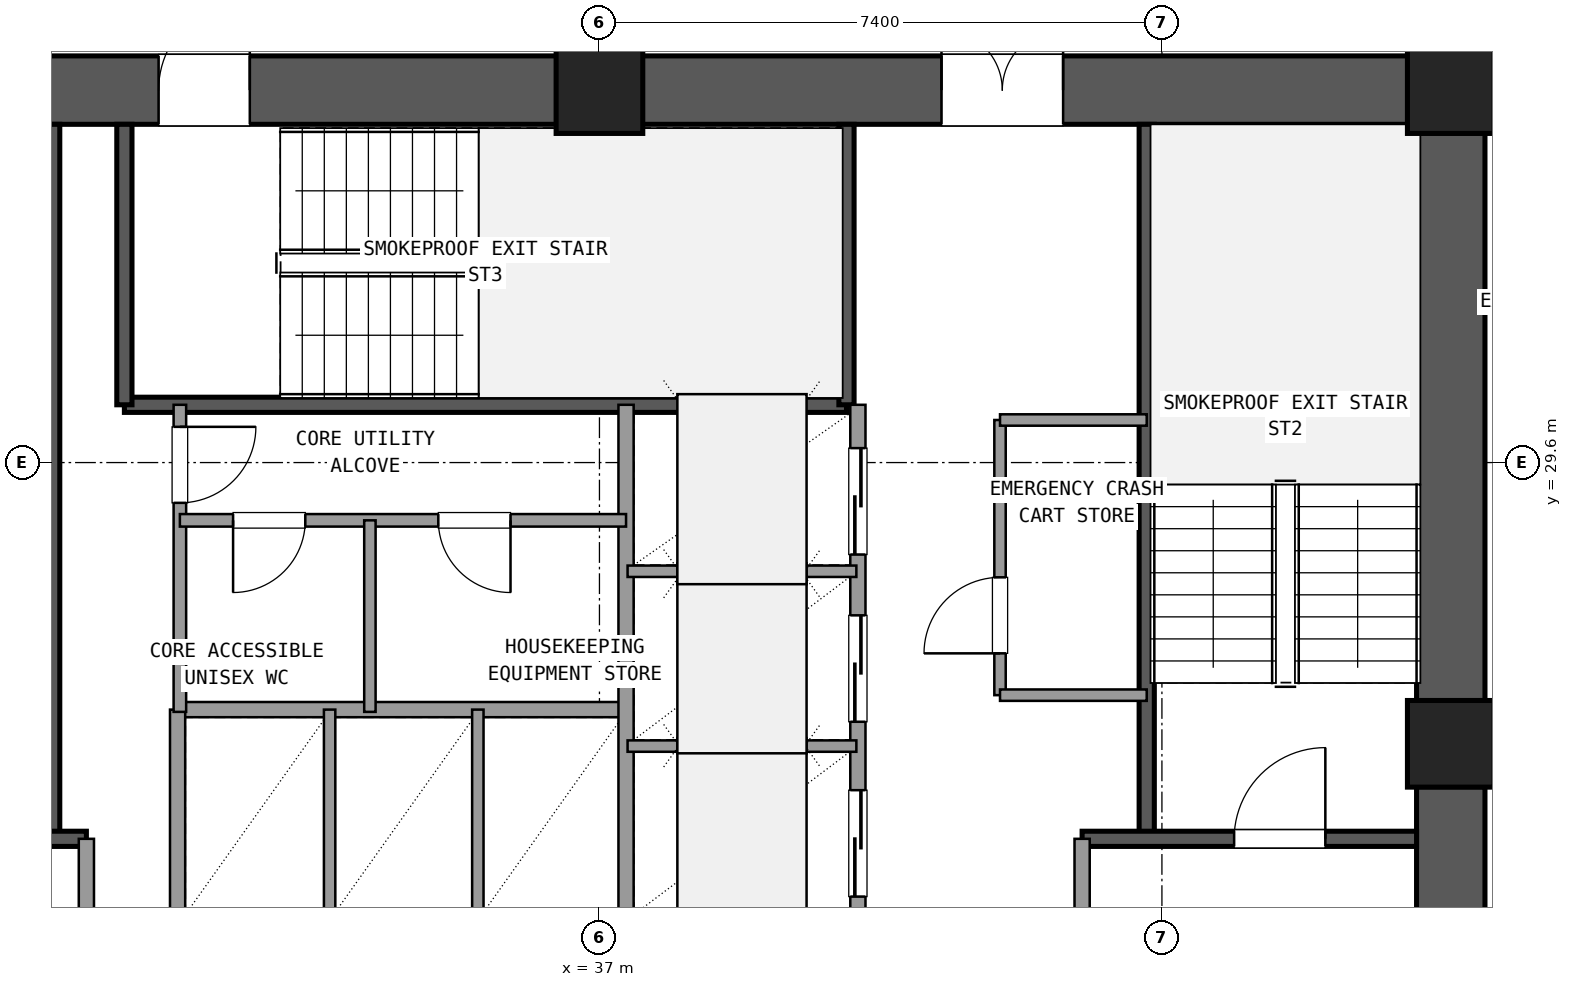
"""IFC4 building model, lengths in metres.
Left out: names, types, materials, properties, quantities, classifications, styles, units other than length and angle.
Written with IfcOpenShell. Run it as: python <this file> out.ifc"""

import sys

from ifc_helpers import new_model, si_unit, direction, frame, frame_2d, origin, origin_2d, place, context, subcontext, project, spatial, rectangle, extrude, element, fill, save


model = new_model("IFC4")
c1 = context("Model", 3, precision=1e-05, world=origin(), true_north=direction((0.0, 1.0)))
c2 = subcontext(c1, "Body", "Model", "MODEL_VIEW")
j1 = project(units=[si_unit("LENGTHUNIT", "METRE"), si_unit("PLANEANGLEUNIT", "RADIAN")], contexts=[c1])
p1 = place(None, origin())
s1 = spatial("IfcSite", under=j1, at=p1, CompositionType="ELEMENT")
p2 = place(p1, origin())
s2 = spatial("IfcBuilding", under=s1, at=p2, CompositionType="ELEMENT")
p3 = place(p2, frame((0.0, 0.0, 56.34)))
s3 = spatial("IfcBuildingStorey", under=s2, at=p3, CompositionType="ELEMENT", Elevation=56.34)
for number, where, z_axis, x_axis in (
    (1, (48.2, 25.9, 0.0), (0.0, 0.0, 1.0), (1.0, 0.0, 0.0)),
    (2, (48.2, 34.5, 0.0), (0.0, 0.0, 1.0), (1.0, 0.0, 0.0)),
    (3, (37.0, 34.5, 0.0), (0.0, 0.0, 1.0), (1.0, 0.0, 0.0)),
):
    element("IfcColumn", number, at=place(p3, frame(where, z_axis=z_axis, x_axis=x_axis)), inside=s3, PredefinedType="COLUMN", context=c2, shape_type="SweptSolid", body=[
        extrude(rectangle(XDim=1.14, YDim=1.14, at=origin_2d()), origin(), (0.0, 0.0, 1.0), 3.6),
    ])
p4 = place(p3, frame((48.2, 17.865, 0.0), z_axis=(0.0, 0.0, 1.0), x_axis=(0.0, 1.0, 0.0)))
e4 = element("IfcWall", 4, at=p4, inside=s3, PredefinedType="SHEAR", context=c2, shape_type="SweptSolid", body=[
    extrude(rectangle(XDim=7.47, YDim=0.9, at=frame_2d((3.735, 0.0))), origin(), (0.0, 0.0, 1.0), 3.32),
])
p5 = place(p4, frame((4.185, 0.0, 0.0)))
e5 = element("IfcOpeningElement", 5, at=p5, cuts=e4, PredefinedType="OPENING", context=c2, shape_type="SweptSolid", body=[
    extrude(rectangle(XDim=1.2, YDim=2.15, at=frame_2d((0.6, 1.075))), frame((0.0, 0.46, 0.0), z_axis=(0.0, -1.0, 0.0), x_axis=(1.0, 0.0, 0.0)), (0.0, 0.0, 1.0), 0.92),
])
p6 = place(p3, frame((48.2, 26.465, 0.0), z_axis=(0.0, 0.0, 1.0), x_axis=(0.0, 1.0, 0.0)))
e6 = element("IfcWall", 6, at=p6, inside=s3, PredefinedType="SHEAR", context=c2, shape_type="SweptSolid", body=[
    extrude(rectangle(XDim=7.47, YDim=0.9, at=frame_2d((3.735, 0.0))), origin(), (0.0, 0.0, 1.0), 3.32),
])
p7 = place(p3, frame((47.635, 34.5, 0.0), z_axis=(0.0, 0.0, 1.0), x_axis=(-1.0, 0.0, 0.0)))
e7 = element("IfcWall", 7, at=p7, inside=s3, PredefinedType="SHEAR", context=c2, shape_type="SweptSolid", body=[
    extrude(rectangle(XDim=10.07, YDim=0.9, at=frame_2d((5.035, 0.0))), origin(), (0.0, 0.0, 1.0), 3.32),
])
p8 = place(p7, frame((4.535, 0.0, 0.0)))
e8 = element("IfcOpeningElement", 8, at=p8, cuts=e7, PredefinedType="OPENING", context=c2, shape_type="SweptSolid", body=[
    extrude(rectangle(XDim=1.6, YDim=2.2, at=frame_2d((0.8, 1.1))), frame((0.0, 0.46, 0.0), z_axis=(0.0, -1.0, 0.0), x_axis=(1.0, 0.0, 0.0)), (0.0, 0.0, 1.0), 0.92),
])
p9 = place(p3, frame((36.435, 34.5, 0.0), z_axis=(0.0, 0.0, 1.0), x_axis=(-1.0, 0.0, 0.0)))
e9 = element("IfcWall", 9, at=p9, inside=s3, PredefinedType="SHEAR", context=c2, shape_type="SweptSolid", body=[
    extrude(rectangle(XDim=10.07, YDim=0.9, at=frame_2d((5.035, 0.0))), origin(), (0.0, 0.0, 1.0), 3.32),
])
p10 = place(p9, frame((4.035, 0.0, 0.0)))
e10 = element("IfcOpeningElement", 10, at=p10, cuts=e9, PredefinedType="OPENING", context=c2, shape_type="SweptSolid", body=[
    extrude(rectangle(XDim=1.2, YDim=2.15, at=frame_2d((0.6, 1.075))), frame((0.0, 0.46, 0.0), z_axis=(0.0, -1.0, 0.0), x_axis=(1.0, 0.0, 0.0)), (0.0, 0.0, 1.0), 0.92),
])
p11 = place(p3, frame((29.8, 24.65, 0.0), z_axis=(0.0, 0.0, 1.0), x_axis=(0.0, 1.0, 0.0)))
e11 = element("IfcWall", 11, at=p11, inside=s3, PredefinedType="SHEAR", context=c2, shape_type="SweptSolid", body=[
    extrude(rectangle(XDim=9.4, YDim=0.2, at=frame_2d((4.7, 0.0))), origin(), (0.0, 0.0, 1.0), 3.32),
])
p12 = place(p3, frame((26.25, 24.65, 0.0), z_axis=(0.0, 0.0, 1.0), x_axis=(1.0, 0.0, 0.0)))
e12 = element("IfcWall", 12, at=p12, inside=s3, PredefinedType="SHEAR", context=c2, shape_type="SweptSolid", body=[
    extrude(rectangle(XDim=4.0, YDim=0.2, at=frame_2d((2.0, 0.0))), origin(), (0.0, 0.0, 1.0), 3.32),
])
p13 = place(p12, frame((1.0, 0.0, 0.0)))
e13 = element("IfcOpeningElement", 13, at=p13, cuts=e12, PredefinedType="OPENING", context=c2, shape_type="SweptSolid", body=[
    extrude(rectangle(XDim=1.2, YDim=2.15, at=frame_2d((0.6, 1.075))), frame((0.0, 0.11, 0.0), z_axis=(0.0, -1.0, 0.0), x_axis=(1.0, 0.0, 0.0)), (0.0, 0.0, 1.0), 0.22),
])
p14 = place(p3, frame((44.2, 24.65, 0.0), z_axis=(0.0, 0.0, 1.0), x_axis=(0.0, 1.0, 0.0)))
e14 = element("IfcWall", 14, at=p14, inside=s3, PredefinedType="SHEAR", context=c2, shape_type="SweptSolid", body=[
    extrude(rectangle(XDim=9.4, YDim=0.2, at=frame_2d((4.7, 0.0))), origin(), (0.0, 0.0, 1.0), 3.32),
])
p15 = place(p3, frame((43.35, 24.65, 0.0), z_axis=(0.0, 0.0, 1.0), x_axis=(1.0, 0.0, 0.0)))
e15 = element("IfcWall", 15, at=p15, inside=s3, PredefinedType="SHEAR", context=c2, shape_type="SweptSolid", body=[
    extrude(rectangle(XDim=4.4, YDim=0.2, at=frame_2d((2.2, 0.0))), origin(), (0.0, 0.0, 1.0), 3.32),
])
p16 = place(p15, frame((2.0, 0.0, 0.0)))
e16 = element("IfcOpeningElement", 16, at=p16, cuts=e15, PredefinedType="OPENING", context=c2, shape_type="SweptSolid", body=[
    extrude(rectangle(XDim=1.2, YDim=2.15, at=frame_2d((0.6, 1.075))), frame((0.0, 0.11, 0.0), z_axis=(0.0, -1.0, 0.0), x_axis=(1.0, 0.0, 0.0)), (0.0, 0.0, 1.0), 0.22),
])
p17 = place(p3, frame((30.75, 30.36, 0.0), z_axis=(0.0, 0.0, 1.0), x_axis=(1.0, 0.0, 0.0)))
e17 = element("IfcWall", 17, at=p17, inside=s3, PredefinedType="SHEAR", context=c2, shape_type="SweptSolid", body=[
    extrude(rectangle(XDim=9.5, YDim=0.2, at=frame_2d((4.75, 0.0))), origin(), (0.0, 0.0, 1.0), 3.32),
])
for number, where, z_axis, x_axis in (
    (18, (30.75, 30.36, 0.0), (0.0, 0.0, 1.0), (0.0, 1.0, 0.0)),
    (19, (40.25, 30.36, 0.0), (0.0, 0.0, 1.0), (0.0, 1.0, 0.0)),
):
    element("IfcWall", number, at=place(p3, frame(where, z_axis=z_axis, x_axis=x_axis)), inside=s3, PredefinedType="SHEAR", context=c2, shape_type="SweptSolid", body=[
        extrude(rectangle(XDim=3.69, YDim=0.2, at=frame_2d((1.845, 0.0))), origin(), (0.0, 0.0, 1.0), 3.32),
    ])
p18 = place(p3, frame((30.25, 17.75, 0.0), z_axis=(0.0, 0.0, 1.0), x_axis=(0.0, 1.0, 0.0)))
e20 = element("IfcWall", 20, at=p18, inside=s3, PredefinedType="SOLIDWALL", context=c2, shape_type="SweptSolid", body=[
    extrude(rectangle(XDim=6.9, YDim=0.2, at=frame_2d((3.45, 0.0))), origin(), (0.0, 0.0, 1.0), 2.61),
])
p19 = place(p18, frame((4.15, 0.0, 0.0)))
e21 = element("IfcOpeningElement", 21, at=p19, cuts=e20, PredefinedType="OPENING", context=c2, shape_type="SweptSolid", body=[
    extrude(rectangle(XDim=1.2, YDim=2.15, at=frame_2d((0.6, 1.075))), frame((0.0, 0.11, 0.0), z_axis=(0.0, -1.0, 0.0), x_axis=(1.0, 0.0, 0.0)), (0.0, 0.0, 1.0), 0.22),
])
p20 = place(p3, frame((43.35, 17.75, 0.0), z_axis=(0.0, 0.0, 1.0), x_axis=(0.0, 1.0, 0.0)))
e22 = element("IfcWall", 22, at=p20, inside=s3, PredefinedType="SOLIDWALL", context=c2, shape_type="SweptSolid", body=[
    extrude(rectangle(XDim=6.9, YDim=0.2, at=frame_2d((3.45, 0.0))), origin(), (0.0, 0.0, 1.0), 2.61),
])
p21 = place(p20, frame((4.15, 0.0, 0.0)))
e23 = element("IfcOpeningElement", 23, at=p21, cuts=e22, PredefinedType="OPENING", context=c2, shape_type="SweptSolid", body=[
    extrude(rectangle(XDim=1.2, YDim=2.15, at=frame_2d((0.6, 1.075))), frame((0.0, 0.11, 0.0), z_axis=(0.0, -1.0, 0.0), x_axis=(1.0, 0.0, 0.0)), (0.0, 0.0, 1.0), 0.22),
])
p22 = place(p3, frame((31.45, 26.35, 0.0), z_axis=(0.0, 0.0, 1.0), x_axis=(1.0, 0.0, 0.0)))
e24 = element("IfcWall", 24, at=p22, inside=s3, PredefinedType="SOLIDWALL", context=c2, shape_type="SweptSolid", body=[
    extrude(rectangle(XDim=5.9, YDim=0.2, at=frame_2d((2.95, 0.0))), origin(), (0.0, 0.0, 1.0), 2.61),
])
p23 = place(p3, frame((31.45, 23.54, 0.0), z_axis=(0.0, 0.0, 1.0), x_axis=(0.0, 1.0, 0.0)))
e25 = element("IfcWall", 25, at=p23, inside=s3, PredefinedType="SOLIDWALL", context=c2, shape_type="SweptSolid", body=[
    extrude(rectangle(XDim=2.81, YDim=0.2, at=frame_2d((1.405, 0.0))), origin(), (0.0, 0.0, 1.0), 2.61),
])
for number, where, z_axis, x_axis in (
    (26, (33.45, 23.54, 0.0), (0.0, 0.0, 1.0), (0.0, 1.0, 0.0)),
    (27, (35.4, 23.54, 0.0), (0.0, 0.0, 1.0), (0.0, 1.0, 0.0)),
):
    element("IfcWall", number, at=place(p3, frame(where, z_axis=z_axis, x_axis=x_axis)), inside=s3, PredefinedType="PARTITIONING", context=c2, shape_type="SweptSolid", body=[
        extrude(rectangle(XDim=2.81, YDim=0.15, at=frame_2d((1.405, 0.0))), origin(), (0.0, 0.0, 1.0), 2.61),
    ])
p24 = place(p3, frame((37.35, 23.54, 0.0), z_axis=(0.0, 0.0, 1.0), x_axis=(0.0, 1.0, 0.0)))
e28 = element("IfcWall", 28, at=p24, inside=s3, PredefinedType="SOLIDWALL", context=c2, shape_type="SweptSolid", body=[
    extrude(rectangle(XDim=6.82, YDim=0.2, at=frame_2d((3.41, 0.0))), origin(), (0.0, 0.0, 1.0), 2.61),
])
p25 = place(p3, frame((40.4, 23.54, 0.0), z_axis=(0.0, 0.0, 1.0), x_axis=(0.0, 1.0, 0.0)))
e29 = element("IfcWall", 29, at=p25, inside=s3, PredefinedType="SOLIDWALL", context=c2, shape_type="SweptSolid", body=[
    extrude(rectangle(XDim=6.82, YDim=0.2, at=frame_2d((3.41, 0.0))), origin(), (0.0, 0.0, 1.0), 2.61),
])
p26 = place(p25, frame((0.35, 0.0, 0.0)))
e30 = element("IfcOpeningElement", 30, at=p26, cuts=e29, PredefinedType="OPENING", context=c2, shape_type="SweptSolid", body=[
    extrude(rectangle(XDim=1.4, YDim=2.2, at=frame_2d((0.7, 1.1))), frame((0.0, 0.11, 0.0), z_axis=(0.0, -1.0, 0.0), x_axis=(1.0, 0.0, 0.0)), (0.0, 0.0, 1.0), 0.22),
])
p27 = place(p25, frame((2.65, 0.0, 0.0)))
e31 = element("IfcOpeningElement", 31, at=p27, cuts=e29, PredefinedType="OPENING", context=c2, shape_type="SweptSolid", body=[
    extrude(rectangle(XDim=1.4, YDim=2.2, at=frame_2d((0.7, 1.1))), frame((0.0, 0.11, 0.0), z_axis=(0.0, -1.0, 0.0), x_axis=(1.0, 0.0, 0.0)), (0.0, 0.0, 1.0), 0.22),
])
p28 = place(p25, frame((4.85, 0.0, 0.0)))
e32 = element("IfcOpeningElement", 32, at=p28, cuts=e29, PredefinedType="OPENING", context=c2, shape_type="SweptSolid", body=[
    extrude(rectangle(XDim=1.4, YDim=2.2, at=frame_2d((0.7, 1.1))), frame((0.0, 0.11, 0.0), z_axis=(0.0, -1.0, 0.0), x_axis=(1.0, 0.0, 0.0)), (0.0, 0.0, 1.0), 0.22),
])
for number, where, z_axis, x_axis in (
    (33, (37.37, 25.87, 0.0), (0.0, 0.0, 1.0), (1.0, 0.0, 0.0)),
    (34, (37.37, 28.17, 0.0), (0.0, 0.0, 1.0), (1.0, 0.0, 0.0)),
):
    element("IfcWall", number, at=place(p3, frame(where, z_axis=z_axis, x_axis=x_axis)), inside=s3, PredefinedType="PARTITIONING", context=c2, shape_type="SweptSolid", body=[
        extrude(rectangle(XDim=3.01, YDim=0.15, at=frame_2d((1.505, 0.0))), origin(), (0.0, 0.0, 1.0), 2.61),
    ])
p29 = place(p3, frame((42.27, 26.54, 0.0), z_axis=(0.0, 0.0, 1.0), x_axis=(0.0, 1.0, 0.0)))
e35 = element("IfcWall", 35, at=p29, inside=s3, PredefinedType="PARTITIONING", context=c2, shape_type="SweptSolid", body=[
    extrude(rectangle(XDim=3.62, YDim=0.15, at=frame_2d((1.81, 0.0))), origin(), (0.0, 0.0, 1.0), 2.61),
])
p30 = place(p29, frame((0.55, 0.0, 0.0)))
e36 = element("IfcOpeningElement", 36, at=p30, cuts=e35, PredefinedType="OPENING", context=c2, shape_type="SweptSolid", body=[
    extrude(rectangle(XDim=1.0, YDim=2.15, at=frame_2d((0.5, 1.075))), frame((0.0, 0.085, 0.0), z_axis=(0.0, -1.0, 0.0), x_axis=(1.0, 0.0, 0.0)), (0.0, 0.0, 1.0), 0.17),
])
for number, where, z_axis, x_axis in (
    (37, (42.27, 26.54, 0.0), (0.0, 0.0, 1.0), (1.0, 0.0, 0.0)),
    (38, (42.27, 30.16, 0.0), (0.0, 0.0, 1.0), (1.0, 0.0, 0.0)),
):
    element("IfcWall", number, at=place(p3, frame(where, z_axis=z_axis, x_axis=x_axis)), inside=s3, PredefinedType="PARTITIONING", context=c2, shape_type="SweptSolid", body=[
        extrude(rectangle(XDim=1.93, YDim=0.15, at=frame_2d((0.965, 0.0))), origin(), (0.0, 0.0, 1.0), 2.61),
    ])
p31 = place(p3, frame((31.48, 26.32, 0.0), z_axis=(0.0, 0.0, 1.0), x_axis=(0.0, 1.0, 0.0)))
e39 = element("IfcWall", 39, at=p31, inside=s3, PredefinedType="PLUMBINGWALL", context=c2, shape_type="SweptSolid", body=[
    extrude(rectangle(XDim=4.04, YDim=0.165, at=frame_2d((2.02, 0.0))), origin(), (0.0, 0.0, 1.0), 2.61),
])
p32 = place(p31, frame((2.75, 0.0, 0.0)))
e40 = element("IfcOpeningElement", 40, at=p32, cuts=e39, PredefinedType="OPENING", context=c2, shape_type="SweptSolid", body=[
    extrude(rectangle(XDim=1.0, YDim=2.15, at=frame_2d((0.5, 1.075))), frame((0.0, 0.093, 0.0), z_axis=(0.0, -1.0, 0.0), x_axis=(1.0, 0.0, 0.0)), (0.0, 0.0, 1.0), 0.185),
])
p33 = place(p3, frame((31.48, 28.84, 0.0), z_axis=(0.0, 0.0, 1.0), x_axis=(1.0, 0.0, 0.0)))
e41 = element("IfcWall", 41, at=p33, inside=s3, PredefinedType="PLUMBINGWALL", context=c2, shape_type="SweptSolid", body=[
    extrude(rectangle(XDim=5.87, YDim=0.165, at=frame_2d((2.935, 0.0))), origin(), (0.0, 0.0, 1.0), 2.61),
])
p34 = place(p33, frame((0.7, 0.0, 0.0)))
e42 = element("IfcOpeningElement", 42, at=p34, cuts=e41, PredefinedType="OPENING", context=c2, shape_type="SweptSolid", body=[
    extrude(rectangle(XDim=0.95, YDim=2.1, at=frame_2d((0.475, 1.05))), frame((0.0, 0.093, 0.0), z_axis=(0.0, -1.0, 0.0), x_axis=(1.0, 0.0, 0.0)), (0.0, 0.0, 1.0), 0.185),
])
p35 = place(p33, frame((3.4, 0.0, 0.0)))
e43 = element("IfcOpeningElement", 43, at=p35, cuts=e41, PredefinedType="OPENING", context=c2, shape_type="SweptSolid", body=[
    extrude(rectangle(XDim=0.95, YDim=2.1, at=frame_2d((0.475, 1.05))), frame((0.0, 0.093, 0.0), z_axis=(0.0, -1.0, 0.0), x_axis=(1.0, 0.0, 0.0)), (0.0, 0.0, 1.0), 0.185),
])
p36 = place(p3, frame((33.98, 26.32, 0.0), z_axis=(0.0, 0.0, 1.0), x_axis=(0.0, 1.0, 0.0)))
e44 = element("IfcWall", 44, at=p36, inside=s3, PredefinedType="PARTITIONING", context=c2, shape_type="SweptSolid", body=[
    extrude(rectangle(XDim=2.52, YDim=0.15, at=frame_2d((1.26, 0.0))), origin(), (0.0, 0.0, 1.0), 2.61),
])
p37 = place(p3, frame((37.0, 34.95, 0.0), z_axis=(0.0, 0.0, 1.0), x_axis=(0.0, 1.0, 0.0)))
e45 = element("IfcWall", 45, at=p37, inside=s3, PredefinedType="PARTITIONING", context=c2, shape_type="SweptSolid", body=[
    extrude(rectangle(XDim=2.7, YDim=0.18, at=frame_2d((1.35, 0.0))), origin(), (0.0, 0.0, 1.0), 2.61),
])
p38 = place(p37, frame((0.35, 0.0, 0.0)))
e46 = element("IfcOpeningElement", 46, at=p38, cuts=e45, PredefinedType="OPENING", context=c2, shape_type="SweptSolid", body=[
    extrude(rectangle(XDim=2.0, YDim=2.2, at=frame_2d((1.0, 1.1))), frame((0.0, 0.1, 0.0), z_axis=(0.0, -1.0, 0.0), x_axis=(1.0, 0.0, 0.0)), (0.0, 0.0, 1.0), 0.2),
])
p39 = place(p16, origin())
e47 = element("IfcDoor", 47, at=p39, inside=s3, OperationType="SINGLE_SWING_RIGHT", PredefinedType="DOOR", context=c2, shape_type="SweptSolid", body=[
    extrude(rectangle(XDim=1.2, YDim=2.15, at=frame_2d((0.6, 1.075))), frame((0.0, 0.025, 0.0), z_axis=(0.0, -1.0, 0.0), x_axis=(1.0, 0.0, 0.0)), (0.0, 0.0, 1.0), 0.05),
])
fill(e16, e47)
p40 = place(p8, frame((1.6, 0.0, 0.0), z_axis=(0.0, 0.0, 1.0), x_axis=(-1.0, 0.0, 0.0)))
e48 = element("IfcDoor", 48, at=p40, inside=s3, OperationType="DOUBLE_DOOR_SINGLE_SWING", PredefinedType="DOOR", context=c2, shape_type="SweptSolid", body=[
    extrude(rectangle(XDim=1.6, YDim=2.2, at=frame_2d((0.8, 1.1))), frame((0.0, 0.025, 0.0), z_axis=(0.0, -1.0, 0.0), x_axis=(1.0, 0.0, 0.0)), (0.0, 0.0, 1.0), 0.05),
])
fill(e8, e48)
p41 = place(p10, frame((1.2, 0.0, 0.0), z_axis=(0.0, 0.0, 1.0), x_axis=(-1.0, 0.0, 0.0)))
e49 = element("IfcDoor", 49, at=p41, inside=s3, OperationType="SINGLE_SWING_LEFT", PredefinedType="DOOR", context=c2, shape_type="SweptSolid", body=[
    extrude(rectangle(XDim=1.2, YDim=2.15, at=frame_2d((0.6, 1.075))), frame((0.0, 0.025, 0.0), z_axis=(0.0, -1.0, 0.0), x_axis=(1.0, 0.0, 0.0)), (0.0, 0.0, 1.0), 0.05),
])
fill(e10, e49)
p42 = place(p26, origin())
e50 = element("IfcDoor", 50, at=p42, inside=s3, OperationType="SLIDING_TO_LEFT", PredefinedType="DOOR", context=c2, shape_type="SweptSolid", body=[
    extrude(rectangle(XDim=1.4, YDim=2.2, at=frame_2d((0.7, 1.1))), frame((0.0, 0.025, 0.0), z_axis=(0.0, -1.0, 0.0), x_axis=(1.0, 0.0, 0.0)), (0.0, 0.0, 1.0), 0.05),
])
fill(e30, e50)
p43 = place(p27, origin())
e51 = element("IfcDoor", 51, at=p43, inside=s3, OperationType="SLIDING_TO_LEFT", PredefinedType="DOOR", context=c2, shape_type="SweptSolid", body=[
    extrude(rectangle(XDim=1.4, YDim=2.2, at=frame_2d((0.7, 1.1))), frame((0.0, 0.025, 0.0), z_axis=(0.0, -1.0, 0.0), x_axis=(1.0, 0.0, 0.0)), (0.0, 0.0, 1.0), 0.05),
])
fill(e31, e51)
p44 = place(p28, origin())
e52 = element("IfcDoor", 52, at=p44, inside=s3, OperationType="SLIDING_TO_RIGHT", PredefinedType="DOOR", context=c2, shape_type="SweptSolid", body=[
    extrude(rectangle(XDim=1.4, YDim=2.2, at=frame_2d((0.7, 1.1))), frame((0.0, 0.025, 0.0), z_axis=(0.0, -1.0, 0.0), x_axis=(1.0, 0.0, 0.0)), (0.0, 0.0, 1.0), 0.05),
])
fill(e32, e52)
p45 = place(p30, origin())
e53 = element("IfcDoor", 53, at=p45, inside=s3, OperationType="SINGLE_SWING_LEFT", PredefinedType="DOOR", context=c2, shape_type="SweptSolid", body=[
    extrude(rectangle(XDim=1.0, YDim=2.15, at=frame_2d((0.5, 1.075))), frame((0.0, 0.025, 0.0), z_axis=(0.0, -1.0, 0.0), x_axis=(1.0, 0.0, 0.0)), (0.0, 0.0, 1.0), 0.05),
])
fill(e36, e53)
p46 = place(p32, frame((1.0, 0.0, 0.0), z_axis=(0.0, 0.0, 1.0), x_axis=(-1.0, 0.0, 0.0)))
e54 = element("IfcDoor", 54, at=p46, inside=s3, OperationType="SINGLE_SWING_RIGHT", PredefinedType="DOOR", context=c2, shape_type="SweptSolid", body=[
    extrude(rectangle(XDim=1.0, YDim=2.15, at=frame_2d((0.5, 1.075))), frame((0.0, 0.025, 0.0), z_axis=(0.0, -1.0, 0.0), x_axis=(1.0, 0.0, 0.0)), (0.0, 0.0, 1.0), 0.05),
])
fill(e40, e54)
p47 = place(p34, frame((0.95, 0.0, 0.0), z_axis=(0.0, 0.0, 1.0), x_axis=(-1.0, 0.0, 0.0)))
e55 = element("IfcDoor", 55, at=p47, inside=s3, OperationType="SINGLE_SWING_LEFT", PredefinedType="DOOR", context=c2, shape_type="SweptSolid", body=[
    extrude(rectangle(XDim=0.95, YDim=2.1, at=frame_2d((0.475, 1.05))), frame((0.0, 0.025, 0.0), z_axis=(0.0, -1.0, 0.0), x_axis=(1.0, 0.0, 0.0)), (0.0, 0.0, 1.0), 0.05),
])
fill(e42, e55)
p48 = place(p35, frame((0.95, 0.0, 0.0), z_axis=(0.0, 0.0, 1.0), x_axis=(-1.0, 0.0, 0.0)))
e56 = element("IfcDoor", 56, at=p48, inside=s3, OperationType="SINGLE_SWING_RIGHT", PredefinedType="DOOR", context=c2, shape_type="SweptSolid", body=[
    extrude(rectangle(XDim=0.95, YDim=2.1, at=frame_2d((0.475, 1.05))), frame((0.0, 0.025, 0.0), z_axis=(0.0, -1.0, 0.0), x_axis=(1.0, 0.0, 0.0)), (0.0, 0.0, 1.0), 0.05),
])
fill(e43, e56)
save(model, sys.argv[1])
